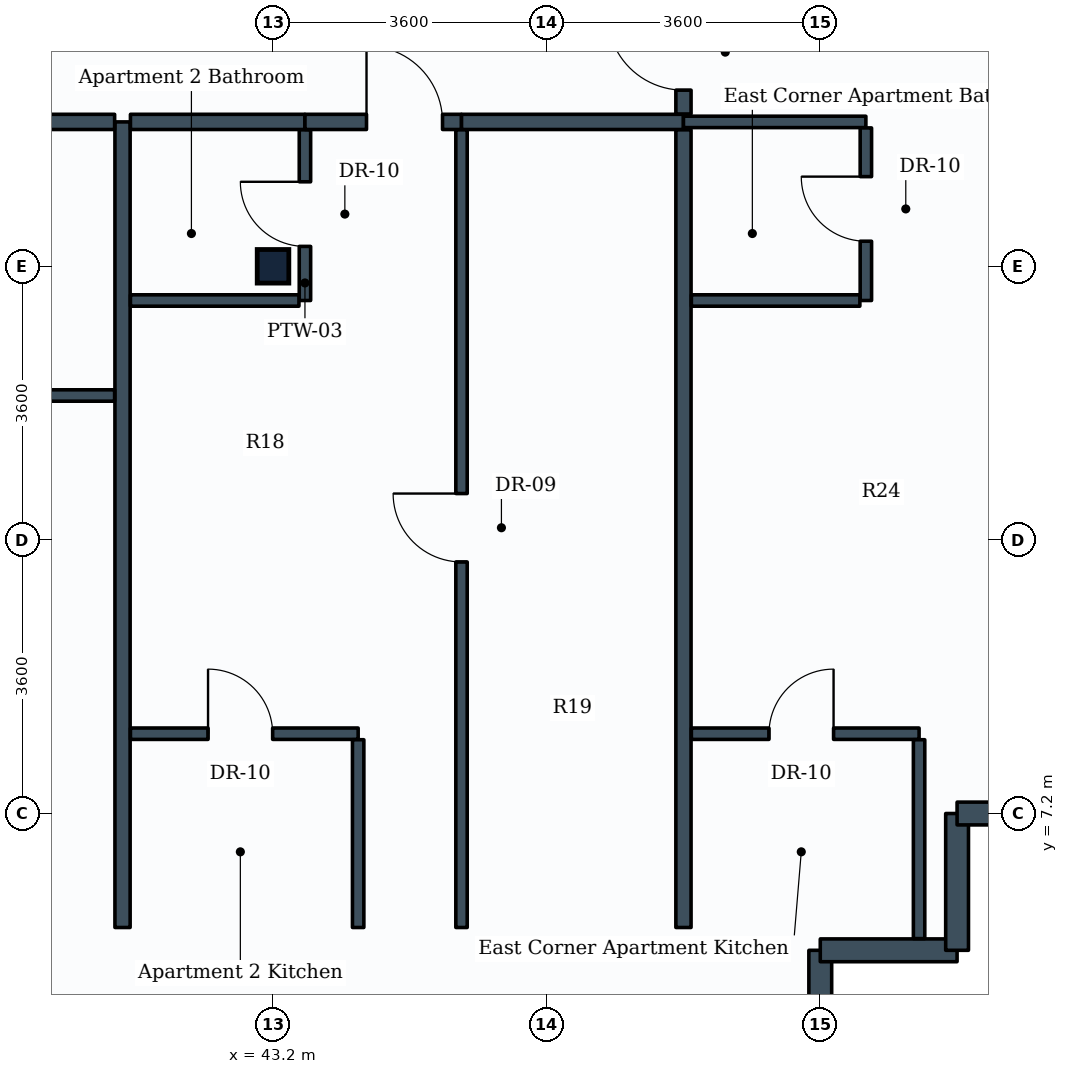
"""IFC4 building model, lengths in metres.
Left out: names, types, materials, properties, quantities, classifications, styles, units other than length and angle.
Written with IfcOpenShell. Run it as: python <this file> out.ifc"""

import sys

from ifc_helpers import new_model, si_unit, direction, frame, frame_2d, origin, origin_2d, place, context, subcontext, project, spatial, rectangle, i_section, extrude, element, fill, save


model = new_model("IFC4")
c1 = context("Model", 3, precision=1e-05, world=origin(), true_north=direction((0.0, 1.0)))
c2 = subcontext(c1, "Body", "Model", "MODEL_VIEW")
j1 = project(units=[si_unit("LENGTHUNIT", "METRE"), si_unit("PLANEANGLEUNIT", "RADIAN")], contexts=[c1])
p1 = place(None, origin())
s1 = spatial("IfcSite", under=j1, at=p1, CompositionType="ELEMENT")
p2 = place(p1, origin())
s2 = spatial("IfcBuilding", under=s1, at=p2, CompositionType="ELEMENT")
p3 = place(p2, frame((0.0, 0.0, 139.0)))
s3 = spatial("IfcBuildingStorey", under=s2, at=p3, CompositionType="ELEMENT", Elevation=139.0)
p4 = place(p3, frame((43.2, 14.4, 0.0), z_axis=(0.0, 0.0, 1.0), x_axis=(1.0, 0.0, 0.0)))
e1 = element("IfcColumn", 1, at=p4, inside=s3, PredefinedType="COLUMN", context=c2, shape_type="SweptSolid", body=[
    extrude(i_section(OverallWidth=0.416, OverallDepth=0.442, WebThickness=0.025, FlangeThickness=0.041, FilletRadius=0.015, at=origin_2d()), origin(), (0.0, 0.0, 1.0), 3.8),
])
p5 = place(p3, frame((50.4, 5.4, 0.0), z_axis=(0.0, 0.0, 1.0), x_axis=(0.0, -1.0, 0.0)))
e2 = element("IfcWall", 2, at=p5, inside=s3, PredefinedType="STANDARD", context=c2, shape_type="SweptSolid", body=[
    extrude(rectangle(XDim=1.8, YDim=0.3, at=frame_2d((0.9, 0.0))), origin(), (0.0, 0.0, 1.0), 2.93),
])
for number, where, z_axis, x_axis in (
    (3, (52.2, 5.4, 0.0), (0.0, 0.0, 1.0), (-1.0, 0.0, 0.0)),
    (4, (52.2, 7.2, 0.0), (0.0, 0.0, 1.0), (0.0, -1.0, 0.0)),
):
    element("IfcWall", number, at=place(p3, frame(where, z_axis=z_axis, x_axis=x_axis)), inside=s3, PredefinedType="STANDARD", context=c2, shape_type="SweptSolid", body=[
        extrude(rectangle(XDim=1.8, YDim=0.3, at=frame_2d((0.9, 0.0))), origin(), (0.0, 0.0, 1.0), 3.535),
    ])
p6 = place(p3, frame((54.0, 7.2, 0.0), z_axis=(0.0, 0.0, 1.0), x_axis=(-1.0, 0.0, 0.0)))
e5 = element("IfcWall", 5, at=p6, inside=s3, PredefinedType="STANDARD", context=c2, shape_type="SweptSolid", body=[
    extrude(rectangle(XDim=1.8, YDim=0.3, at=frame_2d((0.9, 0.0))), origin(), (0.0, 0.0, 1.0), 2.93),
])
p7 = place(p3, frame((41.22, 5.7, 0.0), z_axis=(0.0, 0.0, 1.0), x_axis=(0.0, 1.0, 0.0)))
e6 = element("IfcWall", 6, at=p7, inside=s3, PredefinedType="PARTITIONING", context=c2, shape_type="SweptSolid", body=[
    extrude(rectangle(XDim=10.6, YDim=0.2, at=frame_2d((5.3, 0.0))), origin(), (0.0, 0.0, 1.0), 3.13),
])
p8 = place(p3, frame((36.8, 16.3, 0.0), z_axis=(0.0, 0.0, 1.0), x_axis=(1.0, 0.0, 0.0)))
e7 = element("IfcWall", 7, at=p8, inside=s3, PredefinedType="PARTITIONING", context=c2, shape_type="SweptSolid", body=[
    extrude(rectangle(XDim=4.316, YDim=0.2, at=frame_2d((2.158, 0.0))), origin(), (0.0, 0.0, 1.0), 3.17),
])
p9 = place(p8, frame((1.71, 0.0, 0.0)))
e8 = element("IfcOpeningElement", 8, at=p9, cuts=e7, PredefinedType="OPENING", context=c2, shape_type="SweptSolid", body=[
    extrude(rectangle(XDim=1.0, YDim=2.1, at=frame_2d((0.5, 1.05))), frame((0.0, 0.11, 0.0), z_axis=(0.0, -1.0, 0.0), x_axis=(1.0, 0.0, 0.0)), (0.0, 0.0, 1.0), 0.22),
])
p10 = place(p3, frame((37.5, 12.7, 0.0), z_axis=(0.0, 0.0, 1.0), x_axis=(1.0, 0.0, 0.0)))
e9 = element("IfcWall", 9, at=p10, inside=s3, PredefinedType="PARTITIONING", context=c2, shape_type="SweptSolid", body=[
    extrude(rectangle(XDim=3.616, YDim=0.15, at=frame_2d((1.808, 0.0))), origin(), (0.0, 0.0, 1.0), 3.17),
])
p11 = place(p10, frame((1.371, 0.0, 0.0)))
e10 = element("IfcOpeningElement", 10, at=p11, cuts=e9, PredefinedType="OPENING", context=c2, shape_type="SweptSolid", body=[
    extrude(rectangle(XDim=0.9, YDim=2.1, at=frame_2d((0.45, 1.05))), frame((0.0, 0.085, 0.0), z_axis=(0.0, -1.0, 0.0), x_axis=(1.0, 0.0, 0.0)), (0.0, 0.0, 1.0), 0.17),
])
p12 = place(p3, frame((41.324, 16.3, 0.0), z_axis=(0.0, 0.0, 1.0), x_axis=(1.0, 0.0, 0.0)))
e11 = element("IfcWall", 11, at=p12, inside=s3, PredefinedType="PARTITIONING", context=c2, shape_type="SweptSolid", body=[
    extrude(rectangle(XDim=2.296, YDim=0.2, at=frame_2d((1.148, 0.0))), origin(), (0.0, 0.0, 1.0), 3.18),
])
p13 = place(p3, frame((43.62, 13.95, 0.0), z_axis=(0.0, 0.0, 1.0), x_axis=(0.0, 1.0, 0.0)))
e12 = element("IfcWall", 12, at=p13, inside=s3, PredefinedType="PARTITIONING", context=c2, shape_type="SweptSolid", body=[
    extrude(rectangle(XDim=2.246, YDim=0.15, at=frame_2d((1.123, 0.0))), origin(), (0.0, 0.0, 1.0), 3.17),
])
p14 = place(p13, frame((0.712, 0.0, 0.0)))
e13 = element("IfcOpeningElement", 13, at=p14, cuts=e12, PredefinedType="OPENING", context=c2, shape_type="SweptSolid", body=[
    extrude(rectangle(XDim=0.85, YDim=2.1, at=frame_2d((0.425, 1.05))), frame((0.0, 0.085, 0.0), z_axis=(0.0, -1.0, 0.0), x_axis=(1.0, 0.0, 0.0)), (0.0, 0.0, 1.0), 0.17),
])
p15 = place(p3, frame((41.324, 13.95, 0.0), z_axis=(0.0, 0.0, 1.0), x_axis=(1.0, 0.0, 0.0)))
e14 = element("IfcWall", 14, at=p15, inside=s3, PredefinedType="PARTITIONING", context=c2, shape_type="SweptSolid", body=[
    extrude(rectangle(XDim=2.217, YDim=0.15, at=frame_2d((1.108, 0.0))), origin(), (0.0, 0.0, 1.0), 3.18),
])
p16 = place(p3, frame((43.62, 16.3, 0.0), z_axis=(0.0, 0.0, 1.0), x_axis=(1.0, 0.0, 0.0)))
e15 = element("IfcWall", 15, at=p16, inside=s3, PredefinedType="PARTITIONING", context=c2, shape_type="SweptSolid", body=[
    extrude(rectangle(XDim=2.06, YDim=0.2, at=frame_2d((1.03, 0.0))), origin(), (0.0, 0.0, 1.0), 3.535),
])
p17 = place(p16, frame((0.81, 0.0, 0.0)))
e16 = element("IfcOpeningElement", 16, at=p17, cuts=e15, PredefinedType="OPENING", context=c2, shape_type="SweptSolid", body=[
    extrude(rectangle(XDim=1.0, YDim=2.1, at=frame_2d((0.5, 1.05))), frame((0.0, 0.11, 0.0), z_axis=(0.0, -1.0, 0.0), x_axis=(1.0, 0.0, 0.0)), (0.0, 0.0, 1.0), 0.22),
])
p18 = place(p3, frame((45.68, 16.3, 0.0), z_axis=(0.0, 0.0, 1.0), x_axis=(1.0, 0.0, 0.0)))
e17 = element("IfcWall", 17, at=p18, inside=s3, PredefinedType="PARTITIONING", context=c2, shape_type="SweptSolid", body=[
    extrude(rectangle(XDim=2.92, YDim=0.2, at=frame_2d((1.46, 0.0))), origin(), (0.0, 0.0, 1.0), 3.17),
])
p19 = place(p3, frame((45.68, 5.7, 0.0), z_axis=(0.0, 0.0, 1.0), x_axis=(0.0, 1.0, 0.0)))
e18 = element("IfcWall", 18, at=p19, inside=s3, PredefinedType="PARTITIONING", context=c2, shape_type="SweptSolid", body=[
    extrude(rectangle(XDim=10.496, YDim=0.15, at=frame_2d((5.248, 0.0))), origin(), (0.0, 0.0, 1.0), 3.17),
])
p20 = place(p19, frame((4.81, 0.0, 0.0)))
e19 = element("IfcOpeningElement", 19, at=p20, cuts=e18, PredefinedType="OPENING", context=c2, shape_type="SweptSolid", body=[
    extrude(rectangle(XDim=0.9, YDim=2.1, at=frame_2d((0.45, 1.05))), frame((0.0, 0.085, 0.0), z_axis=(0.0, -1.0, 0.0), x_axis=(1.0, 0.0, 0.0)), (0.0, 0.0, 1.0), 0.17),
])
p21 = place(p3, frame((41.324, 8.25, 0.0), z_axis=(0.0, 0.0, 1.0), x_axis=(1.0, 0.0, 0.0)))
e20 = element("IfcWall", 20, at=p21, inside=s3, PredefinedType="PARTITIONING", context=c2, shape_type="SweptSolid", body=[
    extrude(rectangle(XDim=2.996, YDim=0.15, at=frame_2d((1.498, 0.0))), origin(), (0.0, 0.0, 1.0), 3.18),
])
p22 = place(p21, frame((1.021, 0.0, 0.0)))
e21 = element("IfcOpeningElement", 21, at=p22, cuts=e20, PredefinedType="OPENING", context=c2, shape_type="SweptSolid", body=[
    extrude(rectangle(XDim=0.85, YDim=2.1, at=frame_2d((0.425, 1.05))), frame((0.0, 0.085, 0.0), z_axis=(0.0, -1.0, 0.0), x_axis=(1.0, 0.0, 0.0)), (0.0, 0.0, 1.0), 0.17),
])
p23 = place(p3, frame((44.32, 5.7, 0.0), z_axis=(0.0, 0.0, 1.0), x_axis=(0.0, 1.0, 0.0)))
e22 = element("IfcWall", 22, at=p23, inside=s3, PredefinedType="PARTITIONING", context=c2, shape_type="SweptSolid", body=[
    extrude(rectangle(XDim=2.471, YDim=0.15, at=frame_2d((1.235, 0.0))), origin(), (0.0, 0.0, 1.0), 3.17),
])
p24 = place(p3, frame((48.6, 5.7, 0.0), z_axis=(0.0, 0.0, 1.0), x_axis=(0.0, 1.0, 0.0)))
e23 = element("IfcWall", 23, at=p24, inside=s3, PredefinedType="PARTITIONING", context=c2, shape_type="SweptSolid", body=[
    extrude(rectangle(XDim=10.496, YDim=0.2, at=frame_2d((5.248, 0.0))), origin(), (0.0, 0.0, 1.0), 3.17),
])
p25 = place(p3, frame((48.6, 16.404, 0.0), z_axis=(0.0, 0.0, 1.0), x_axis=(0.0, 1.0, 0.0)))
e24 = element("IfcWall", 24, at=p25, inside=s3, PredefinedType="PARTITIONING", context=c2, shape_type="SweptSolid", body=[
    extrude(rectangle(XDim=1.667, YDim=0.2, at=frame_2d((0.833, 0.0))), origin(), (0.0, 0.0, 1.0), 3.535),
])
p26 = place(p25, frame((0.314, 0.0, 0.0)))
e25 = element("IfcOpeningElement", 25, at=p26, cuts=e24, PredefinedType="OPENING", context=c2, shape_type="SweptSolid", body=[
    extrude(rectangle(XDim=1.0, YDim=2.1, at=frame_2d((0.5, 1.05))), frame((0.0, 0.11, 0.0), z_axis=(0.0, -1.0, 0.0), x_axis=(1.0, 0.0, 0.0)), (0.0, 0.0, 1.0), 0.22),
])
p27 = place(p3, frame((48.6, 16.3, 0.0), z_axis=(0.0, 0.0, 1.0), x_axis=(1.0, 0.0, 0.0)))
e26 = element("IfcWall", 26, at=p27, inside=s3, PredefinedType="PARTITIONING", context=c2, shape_type="SweptSolid", body=[
    extrude(rectangle(XDim=2.4, YDim=0.15, at=frame_2d((1.2, 0.0))), origin(), (0.0, 0.0, 1.0), 3.535),
])
p28 = place(p3, frame((51.0, 13.95, 0.0), z_axis=(0.0, 0.0, 1.0), x_axis=(0.0, 1.0, 0.0)))
e27 = element("IfcWall", 27, at=p28, inside=s3, PredefinedType="PARTITIONING", context=c2, shape_type="SweptSolid", body=[
    extrude(rectangle(XDim=2.271, YDim=0.15, at=frame_2d((1.135, 0.0))), origin(), (0.0, 0.0, 1.0), 3.17),
])
p29 = place(p28, frame((0.78, 0.0, 0.0)))
e28 = element("IfcOpeningElement", 28, at=p29, cuts=e27, PredefinedType="OPENING", context=c2, shape_type="SweptSolid", body=[
    extrude(rectangle(XDim=0.85, YDim=2.1, at=frame_2d((0.425, 1.05))), frame((0.0, 0.085, 0.0), z_axis=(0.0, -1.0, 0.0), x_axis=(1.0, 0.0, 0.0)), (0.0, 0.0, 1.0), 0.17),
])
p30 = place(p3, frame((48.704, 13.95, 0.0), z_axis=(0.0, 0.0, 1.0), x_axis=(1.0, 0.0, 0.0)))
e29 = element("IfcWall", 29, at=p30, inside=s3, PredefinedType="PARTITIONING", context=c2, shape_type="SweptSolid", body=[
    extrude(rectangle(XDim=2.217, YDim=0.15, at=frame_2d((1.108, 0.0))), origin(), (0.0, 0.0, 1.0), 3.535),
])
p31 = place(p3, frame((48.704, 8.25, 0.0), z_axis=(0.0, 0.0, 1.0), x_axis=(1.0, 0.0, 0.0)))
e30 = element("IfcWall", 30, at=p31, inside=s3, PredefinedType="PARTITIONING", context=c2, shape_type="SweptSolid", body=[
    extrude(rectangle(XDim=2.996, YDim=0.15, at=frame_2d((1.498, 0.0))), origin(), (0.0, 0.0, 1.0), 3.535),
])
p32 = place(p31, frame((1.021, 0.0, 0.0)))
e31 = element("IfcOpeningElement", 31, at=p32, cuts=e30, PredefinedType="OPENING", context=c2, shape_type="SweptSolid", body=[
    extrude(rectangle(XDim=0.85, YDim=2.1, at=frame_2d((0.425, 1.05))), frame((0.0, 0.085, 0.0), z_axis=(0.0, -1.0, 0.0), x_axis=(1.0, 0.0, 0.0)), (0.0, 0.0, 1.0), 0.17),
])
p33 = place(p3, frame((51.7, 5.554, 0.0), z_axis=(0.0, 0.0, 1.0), x_axis=(0.0, 1.0, 0.0)))
e32 = element("IfcWall", 32, at=p33, inside=s3, PredefinedType="PARTITIONING", context=c2, shape_type="SweptSolid", body=[
    extrude(rectangle(XDim=2.617, YDim=0.15, at=frame_2d((1.309, 0.0))), origin(), (0.0, 0.0, 1.0), 3.535),
])
p34 = place(p14, origin())
e33 = element("IfcDoor", 33, at=p34, inside=s3, OperationType="SINGLE_SWING_RIGHT", PredefinedType="DOOR", context=c2, shape_type="SweptSolid", body=[
    extrude(rectangle(XDim=0.85, YDim=2.1, at=frame_2d((0.425, 1.05))), frame((0.0, 0.025, 0.0), z_axis=(0.0, -1.0, 0.0), x_axis=(1.0, 0.0, 0.0)), (0.0, 0.0, 1.0), 0.05),
])
fill(e13, e33)
p35 = place(p17, origin())
e34 = element("IfcDoor", 34, at=p35, inside=s3, OperationType="SINGLE_SWING_LEFT", PredefinedType="DOOR", context=c2, shape_type="SweptSolid", body=[
    extrude(rectangle(XDim=1.0, YDim=2.1, at=frame_2d((0.5, 1.05))), frame((0.0, 0.025, 0.0), z_axis=(0.0, -1.0, 0.0), x_axis=(1.0, 0.0, 0.0)), (0.0, 0.0, 1.0), 0.05),
])
fill(e16, e34)
p36 = place(p20, origin())
e35 = element("IfcDoor", 35, at=p36, inside=s3, OperationType="SINGLE_SWING_RIGHT", PredefinedType="DOOR", context=c2, shape_type="SweptSolid", body=[
    extrude(rectangle(XDim=0.9, YDim=2.1, at=frame_2d((0.45, 1.05))), frame((0.0, 0.025, 0.0), z_axis=(0.0, -1.0, 0.0), x_axis=(1.0, 0.0, 0.0)), (0.0, 0.0, 1.0), 0.05),
])
fill(e19, e35)
p37 = place(p22, origin())
e36 = element("IfcDoor", 36, at=p37, inside=s3, OperationType="SINGLE_SWING_LEFT", PredefinedType="DOOR", context=c2, shape_type="SweptSolid", body=[
    extrude(rectangle(XDim=0.85, YDim=2.1, at=frame_2d((0.425, 1.05))), frame((0.0, 0.025, 0.0), z_axis=(0.0, -1.0, 0.0), x_axis=(1.0, 0.0, 0.0)), (0.0, 0.0, 1.0), 0.05),
])
fill(e21, e36)
p38 = place(p26, origin())
e37 = element("IfcDoor", 37, at=p38, inside=s3, OperationType="SINGLE_SWING_RIGHT", PredefinedType="DOOR", context=c2, shape_type="SweptSolid", body=[
    extrude(rectangle(XDim=1.0, YDim=2.1, at=frame_2d((0.5, 1.05))), frame((0.0, 0.025, 0.0), z_axis=(0.0, -1.0, 0.0), x_axis=(1.0, 0.0, 0.0)), (0.0, 0.0, 1.0), 0.05),
])
fill(e25, e37)
p39 = place(p29, origin())
e38 = element("IfcDoor", 38, at=p39, inside=s3, OperationType="SINGLE_SWING_RIGHT", PredefinedType="DOOR", context=c2, shape_type="SweptSolid", body=[
    extrude(rectangle(XDim=0.85, YDim=2.1, at=frame_2d((0.425, 1.05))), frame((0.0, 0.025, 0.0), z_axis=(0.0, -1.0, 0.0), x_axis=(1.0, 0.0, 0.0)), (0.0, 0.0, 1.0), 0.05),
])
fill(e28, e38)
p40 = place(p32, origin())
e39 = element("IfcDoor", 39, at=p40, inside=s3, OperationType="SINGLE_SWING_RIGHT", PredefinedType="DOOR", context=c2, shape_type="SweptSolid", body=[
    extrude(rectangle(XDim=0.85, YDim=2.1, at=frame_2d((0.425, 1.05))), frame((0.0, 0.025, 0.0), z_axis=(0.0, -1.0, 0.0), x_axis=(1.0, 0.0, 0.0)), (0.0, 0.0, 1.0), 0.05),
])
fill(e31, e39)
save(model, sys.argv[1])
